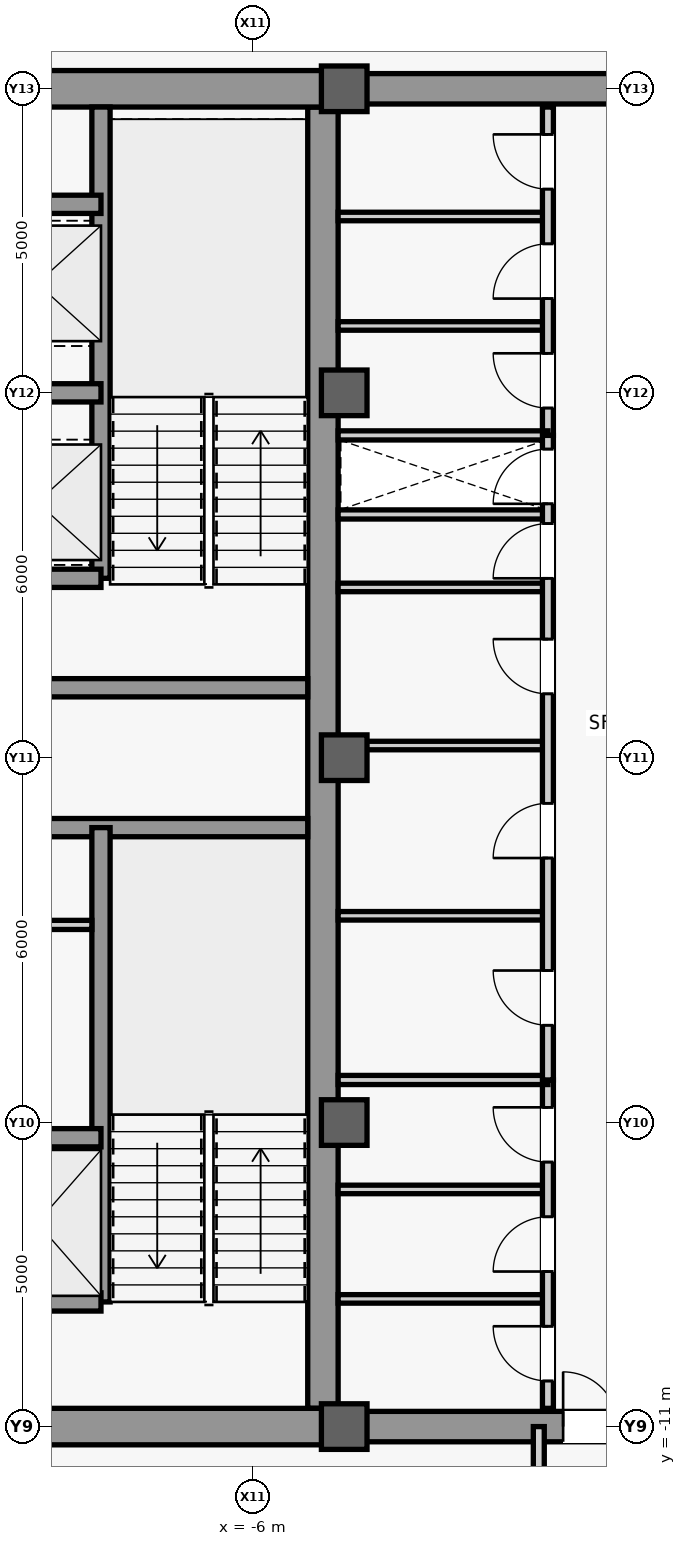
"""IFC4 building model, lengths in metres.
Left out: names, types, materials, properties, quantities, classifications, styles, units other than length and angle.
Written with IfcOpenShell. Run it as: python <this file> out.ifc"""

import sys

from ifc_helpers import new_model, si_unit, direction, frame, frame_2d, origin, origin_2d, place, context, subcontext, project, spatial, rectangle, extrude, source, transform, mapped, element, fill, save


model = new_model("IFC4")
c1 = context("Model", 3, precision=1e-05, world=origin(), true_north=direction((0.0, 1.0)))
c2 = subcontext(c1, "Body", "Model", "MODEL_VIEW")
j1 = project(units=[si_unit("LENGTHUNIT", "METRE"), si_unit("PLANEANGLEUNIT", "RADIAN")], contexts=[c1])
p1 = place(None, origin())
s1 = spatial("IfcSite", under=j1, at=p1, CompositionType="ELEMENT")
p2 = place(p1, origin())
s2 = spatial("IfcBuilding", under=s1, at=p2, CompositionType="ELEMENT")
p3 = place(p2, frame((0.0, 0.0, 277.5)))
s3 = spatial("IfcBuildingStorey", under=s2, at=p3, CompositionType="ELEMENT", Elevation=277.5)
m1 = source(origin(), c2, "Body", "SweptSolid", [
    extrude(rectangle(XDim=21.4, YDim=0.5, at=frame_2d((10.7, 0.0))), origin(), (0.0, 0.0, 1.0), 3.78),
])
p4 = place(p3, frame((-4.85, -10.7, 0.0), z_axis=(0.0, 0.0, 1.0), x_axis=(0.0, 1.0, 0.0)))
e1 = element("IfcWall", 1, at=p4, inside=s3, PredefinedType="SHEAR", context=c2, shape_type="MappedRepresentation", body=[
    mapped(m1, transform((0.0, 0.0, 0.0), scale=1.0)),
])
m2 = source(origin(), c2, "Body", "SweptSolid", [
    extrude(rectangle(XDim=5.9, YDim=0.6, at=frame_2d((2.95, 0.0))), origin(), (0.0, 0.0, 1.0), 3.78),
])
for number, where, z_axis, x_axis in (
    (2, (-10.75, -11.0, 0.0), (0.0, 0.0, 1.0), (1.0, 0.0, 0.0)),
    (3, (-10.75, 11.0, 0.0), (0.0, 0.0, 1.0), (1.0, 0.0, 0.0)),
):
    element("IfcWall", number, at=place(p3, frame(where, z_axis=z_axis, x_axis=x_axis)), inside=s3, PredefinedType="SHEAR", context=c2, shape_type="MappedRepresentation", body=[
        mapped(m2, transform((0.0, 0.0, 0.0), scale=1.0)),
    ])
m3 = source(origin(), c2, "Body", "SweptSolid", [
    extrude(rectangle(XDim=5.65, YDim=0.3, at=frame_2d((2.825, 0.0))), origin(), (0.0, 0.0, 1.0), 3.78),
])
for number, where, z_axis, x_axis in (
    (4, (-10.75, -1.15, 0.0), (0.0, 0.0, 1.0), (1.0, 0.0, 0.0)),
    (5, (-10.75, 1.15, 0.0), (0.0, 0.0, 1.0), (1.0, 0.0, 0.0)),
):
    element("IfcWall", number, at=place(p3, frame(where, z_axis=z_axis, x_axis=x_axis)), inside=s3, PredefinedType="SHEAR", context=c2, shape_type="MappedRepresentation", body=[
        mapped(m3, transform((0.0, 0.0, 0.0), scale=1.0)),
    ])
m4 = source(origin(), c2, "Body", "SweptSolid", [
    extrude(rectangle(XDim=9.2, YDim=0.5, at=frame_2d((4.6, 0.0))), origin(), (0.0, 0.0, 1.0), 3.78),
])
p5 = place(p3, frame((-4.6, -11.0, 0.0), z_axis=(0.0, 0.0, 1.0), x_axis=(1.0, 0.0, 0.0)))
e6 = element("IfcWall", 6, at=p5, inside=s3, PredefinedType="SHEAR", context=c2, shape_type="MappedRepresentation", body=[
    mapped(m4, transform((0.0, 0.0, 0.0), scale=1.0)),
])
m5 = source(origin(), c2, "Body", "SweptSolid", [
    extrude(rectangle(XDim=1.8, YDim=2.25, at=frame_2d((0.9, 1.125))), frame((0.0, 0.26, 0.0), z_axis=(0.0, -1.0, 0.0), x_axis=(1.0, 0.0, 0.0)), (0.0, 0.0, 1.0), 0.52),
])
p6 = place(p5, frame((3.7, 0.0, 0.0)))
e7 = element("IfcOpeningElement", 7, at=p6, cuts=e6, PredefinedType="OPENING", context=c2, shape_type="MappedRepresentation", body=[
    mapped(m5, transform((0.0, 0.0, 0.0), scale=1.0)),
])
p7 = place(p3, frame((-4.6, 11.0, 0.0), z_axis=(0.0, 0.0, 1.0), x_axis=(1.0, 0.0, 0.0)))
e8 = element("IfcWall", 8, at=p7, inside=s3, PredefinedType="SHEAR", context=c2, shape_type="MappedRepresentation", body=[
    mapped(m4, transform((0.0, 0.0, 0.0), scale=1.0)),
])
m6 = source(origin(), c2, "Body", "SweptSolid", [
    extrude(rectangle(XDim=0.75, YDim=0.75, at=origin_2d()), origin(), (0.0, 0.0, 1.0), 4.0),
])
for number, where, z_axis, x_axis in (
    (9, (-4.5, -11.0, 0.0), (0.0, 0.0, 1.0), (1.0, 0.0, 0.0)),
    (10, (-4.5, -6.0, 0.0), (0.0, 0.0, 1.0), (1.0, 0.0, 0.0)),
    (11, (-4.5, 0.0, 0.0), (0.0, 0.0, 1.0), (1.0, 0.0, 0.0)),
    (12, (-4.5, 6.0, 0.0), (0.0, 0.0, 1.0), (1.0, 0.0, 0.0)),
    (13, (-4.5, 11.0, 0.0), (0.0, 0.0, 1.0), (1.0, 0.0, 0.0)),
):
    element("IfcColumn", number, at=place(p3, frame(where, z_axis=z_axis, x_axis=x_axis)), inside=s3, PredefinedType="COLUMN", context=c2, shape_type="MappedRepresentation", body=[
        mapped(m6, transform((0.0, 0.0, 0.0), scale=1.0)),
    ])
m7 = source(origin(), c2, "Body", "SweptSolid", [
    extrude(rectangle(XDim=7.8, YDim=0.3, at=frame_2d((3.9, 0.0))), origin(), (0.0, 0.0, 1.0), 3.78),
])
p8 = place(p3, frame((-8.5, -8.95, 0.0), z_axis=(0.0, 0.0, 1.0), x_axis=(0.0, 1.0, 0.0)))
e14 = element("IfcWall", 14, at=p8, inside=s3, PredefinedType="SHEAR", context=c2, shape_type="MappedRepresentation", body=[
    mapped(m7, transform((0.0, 0.0, 0.0), scale=1.0)),
])
m8 = source(origin(), c2, "Body", "SweptSolid", [
    extrude(rectangle(XDim=2.2, YDim=0.3, at=frame_2d((1.1, 0.0))), origin(), (0.0, 0.0, 1.0), 3.78),
])
for number, where, z_axis, x_axis in (
    (15, (-10.7, -8.95, 0.0), (0.0, 0.0, 1.0), (1.0, 0.0, 0.0)),
    (16, (-10.7, -6.25, 0.0), (0.0, 0.0, 1.0), (1.0, 0.0, 0.0)),
):
    element("IfcWall", number, at=place(p3, frame(where, z_axis=z_axis, x_axis=x_axis)), inside=s3, PredefinedType="SHEAR", context=c2, shape_type="MappedRepresentation", body=[
        mapped(m8, transform((0.0, 0.0, 0.0), scale=1.0)),
    ])
m9 = source(origin(), c2, "Body", "SweptSolid", [
    extrude(rectangle(XDim=7.75, YDim=0.3, at=frame_2d((3.875, 0.0))), origin(), (0.0, 0.0, 1.0), 3.78),
])
p9 = place(p3, frame((-8.5, 2.95, 0.0), z_axis=(0.0, 0.0, 1.0), x_axis=(0.0, 1.0, 0.0)))
e17 = element("IfcWall", 17, at=p9, inside=s3, PredefinedType="SHEAR", context=c2, shape_type="MappedRepresentation", body=[
    mapped(m9, transform((0.0, 0.0, 0.0), scale=1.0)),
])
for number, where, z_axis, x_axis in (
    (18, (-10.7, 2.95, 0.0), (0.0, 0.0, 1.0), (1.0, 0.0, 0.0)),
    (19, (-10.7, 6.0, 0.0), (0.0, 0.0, 1.0), (1.0, 0.0, 0.0)),
    (20, (-10.7, 9.1, 0.0), (0.0, 0.0, 1.0), (1.0, 0.0, 0.0)),
):
    element("IfcWall", number, at=place(p3, frame(where, z_axis=z_axis, x_axis=x_axis)), inside=s3, PredefinedType="SHEAR", context=c2, shape_type="MappedRepresentation", body=[
        mapped(m8, transform((0.0, 0.0, 0.0), scale=1.0)),
    ])
m10 = source(origin(), c2, "Body", "SweptSolid", [
    extrude(rectangle(XDim=2.05, YDim=0.15, at=frame_2d((1.025, 0.0))), origin(), (0.0, 0.0, 1.0), 3.78),
])
p10 = place(p3, frame((-10.7, -2.75, 0.0), z_axis=(0.0, 0.0, 1.0), x_axis=(1.0, 0.0, 0.0)))
e21 = element("IfcWall", 21, at=p10, inside=s3, PredefinedType="PARTITIONING", context=c2, shape_type="MappedRepresentation", body=[
    mapped(m10, transform((0.0, 0.0, 0.0), scale=1.0)),
])
m11 = source(origin(), c2, "Body", "SweptSolid", [
    extrude(rectangle(XDim=3.45, YDim=0.15, at=frame_2d((1.725, 0.0))), origin(), (0.0, 0.0, 1.0), 3.78),
])
p11 = place(p3, frame((-4.6, 4.0, 0.0), z_axis=(0.0, 0.0, 1.0), x_axis=(1.0, 0.0, 0.0)))
e22 = element("IfcWall", 22, at=p11, inside=s3, PredefinedType="PARTITIONING", context=c2, shape_type="MappedRepresentation", body=[
    mapped(m11, transform((0.0, 0.0, 0.0), scale=1.0)),
])
m12 = source(origin(), c2, "Body", "SweptSolid", [
    extrude(rectangle(XDim=3.45, YDim=0.14, at=frame_2d((1.725, 0.0))), origin(), (0.0, 0.0, 1.0), 3.78),
])
for number, where, z_axis, x_axis in (
    (23, (-4.6, -8.9, 0.0), (0.0, 0.0, 1.0), (1.0, 0.0, 0.0)),
    (24, (-4.6, -7.1, 0.0), (0.0, 0.0, 1.0), (1.0, 0.0, 0.0)),
):
    element("IfcWall", number, at=place(p3, frame(where, z_axis=z_axis, x_axis=x_axis)), inside=s3, PredefinedType="PARTITIONING", context=c2, shape_type="MappedRepresentation", body=[
        mapped(m12, transform((0.0, 0.0, 0.0), scale=1.0)),
    ])
m13 = source(origin(), c2, "Body", "SweptSolid", [
    extrude(rectangle(XDim=5.4, YDim=0.18, at=frame_2d((2.7, 0.0))), origin(), (0.0, 0.0, 1.0), 3.78),
])
p12 = place(p3, frame((-1.15, -10.7, 0.0), z_axis=(0.0, 0.0, 1.0), x_axis=(0.0, 1.0, 0.0)))
e25 = element("IfcWall", 25, at=p12, inside=s3, PredefinedType="PARTITIONING", context=c2, shape_type="MappedRepresentation", body=[
    mapped(m13, transform((0.0, 0.0, 0.0), scale=1.0)),
])
m14 = source(origin(), c2, "Body", "SweptSolid", [
    extrude(rectangle(XDim=0.9, YDim=2.15, at=frame_2d((0.45, 1.075))), frame((0.0, 0.1, 0.0), z_axis=(0.0, -1.0, 0.0), x_axis=(1.0, 0.0, 0.0)), (0.0, 0.0, 1.0), 0.2),
])
p13 = place(p12, frame((0.45, 0.0, 0.0)))
e26 = element("IfcOpeningElement", 26, at=p13, cuts=e25, PredefinedType="OPENING", context=c2, shape_type="MappedRepresentation", body=[
    mapped(m14, transform((0.0, 0.0, 0.0), scale=1.0)),
])
p14 = place(p12, frame((2.25, 0.0, 0.0)))
e27 = element("IfcOpeningElement", 27, at=p14, cuts=e25, PredefinedType="OPENING", context=c2, shape_type="MappedRepresentation", body=[
    mapped(m14, transform((0.0, 0.0, 0.0), scale=1.0)),
])
p15 = place(p12, frame((4.05, 0.0, 0.0)))
e28 = element("IfcOpeningElement", 28, at=p15, cuts=e25, PredefinedType="OPENING", context=c2, shape_type="MappedRepresentation", body=[
    mapped(m14, transform((0.0, 0.0, 0.0), scale=1.0)),
])
p16 = place(p3, frame((-4.6, -5.3, 0.0), z_axis=(0.0, 0.0, 1.0), x_axis=(1.0, 0.0, 0.0)))
e29 = element("IfcWall", 29, at=p16, inside=s3, PredefinedType="PARTITIONING", context=c2, shape_type="MappedRepresentation", body=[
    mapped(m11, transform((0.0, 0.0, 0.0), scale=1.0)),
])
for number, where, z_axis, x_axis in (
    (30, (-4.6, 7.1, 0.0), (0.0, 0.0, 1.0), (1.0, 0.0, 0.0)),
    (31, (-4.6, 8.9, 0.0), (0.0, 0.0, 1.0), (1.0, 0.0, 0.0)),
):
    element("IfcWall", number, at=place(p3, frame(where, z_axis=z_axis, x_axis=x_axis)), inside=s3, PredefinedType="PARTITIONING", context=c2, shape_type="MappedRepresentation", body=[
        mapped(m12, transform((0.0, 0.0, 0.0), scale=1.0)),
    ])
p17 = place(p3, frame((-1.15, 5.3, 0.0), z_axis=(0.0, 0.0, 1.0), x_axis=(0.0, 1.0, 0.0)))
e32 = element("IfcWall", 32, at=p17, inside=s3, PredefinedType="PARTITIONING", context=c2, shape_type="MappedRepresentation", body=[
    mapped(m13, transform((0.0, 0.0, 0.0), scale=1.0)),
])
p18 = place(p17, frame((0.45, 0.0, 0.0)))
e33 = element("IfcOpeningElement", 33, at=p18, cuts=e32, PredefinedType="OPENING", context=c2, shape_type="MappedRepresentation", body=[
    mapped(m14, transform((0.0, 0.0, 0.0), scale=1.0)),
])
p19 = place(p17, frame((2.25, 0.0, 0.0)))
e34 = element("IfcOpeningElement", 34, at=p19, cuts=e32, PredefinedType="OPENING", context=c2, shape_type="MappedRepresentation", body=[
    mapped(m14, transform((0.0, 0.0, 0.0), scale=1.0)),
])
p20 = place(p17, frame((4.05, 0.0, 0.0)))
e35 = element("IfcOpeningElement", 35, at=p20, cuts=e32, PredefinedType="OPENING", context=c2, shape_type="MappedRepresentation", body=[
    mapped(m14, transform((0.0, 0.0, 0.0), scale=1.0)),
])
p21 = place(p3, frame((-4.6, 5.3, 0.0), z_axis=(0.0, 0.0, 1.0), x_axis=(1.0, 0.0, 0.0)))
e36 = element("IfcWall", 36, at=p21, inside=s3, PredefinedType="PARTITIONING", context=c2, shape_type="MappedRepresentation", body=[
    mapped(m11, transform((0.0, 0.0, 0.0), scale=1.0)),
])
p22 = place(p3, frame((-4.6, -2.6, 0.0), z_axis=(0.0, 0.0, 1.0), x_axis=(1.0, 0.0, 0.0)))
e37 = element("IfcWall", 37, at=p22, inside=s3, PredefinedType="PARTITIONING", context=c2, shape_type="MappedRepresentation", body=[
    mapped(m12, transform((0.0, 0.0, 0.0), scale=1.0)),
])
m15 = source(origin(), c2, "Body", "SweptSolid", [
    extrude(rectangle(XDim=3.45, YDim=0.14, at=frame_2d((1.725, 0.0))), origin(), (0.0, 0.0, 1.0), 3.085),
])
p23 = place(p3, frame((-4.6, 0.2, 0.0), z_axis=(0.0, 0.0, 1.0), x_axis=(1.0, 0.0, 0.0)))
e38 = element("IfcWall", 38, at=p23, inside=s3, PredefinedType="PARTITIONING", context=c2, shape_type="MappedRepresentation", body=[
    mapped(m15, transform((0.0, 0.0, 0.0), scale=1.0)),
])
p24 = place(p3, frame((-4.6, 2.8, 0.0), z_axis=(0.0, 0.0, 1.0), x_axis=(1.0, 0.0, 0.0)))
e39 = element("IfcWall", 39, at=p24, inside=s3, PredefinedType="PARTITIONING", context=c2, shape_type="MappedRepresentation", body=[
    mapped(m12, transform((0.0, 0.0, 0.0), scale=1.0)),
])
m16 = source(origin(), c2, "Body", "SweptSolid", [
    extrude(rectangle(XDim=10.6, YDim=0.18, at=frame_2d((5.3, 0.0))), origin(), (0.0, 0.0, 1.0), 3.78),
])
p25 = place(p3, frame((-1.15, -5.3, 0.0), z_axis=(0.0, 0.0, 1.0), x_axis=(0.0, 1.0, 0.0)))
e40 = element("IfcWall", 40, at=p25, inside=s3, PredefinedType="PARTITIONING", context=c2, shape_type="MappedRepresentation", body=[
    mapped(m16, transform((0.0, 0.0, 0.0), scale=1.0)),
])
p26 = place(p25, frame((0.9, 0.0, 0.0)))
e41 = element("IfcOpeningElement", 41, at=p26, cuts=e40, PredefinedType="OPENING", context=c2, shape_type="MappedRepresentation", body=[
    mapped(m14, transform((0.0, 0.0, 0.0), scale=1.0)),
])
p27 = place(p25, frame((3.65, 0.0, 0.0)))
e42 = element("IfcOpeningElement", 42, at=p27, cuts=e40, PredefinedType="OPENING", context=c2, shape_type="MappedRepresentation", body=[
    mapped(m14, transform((0.0, 0.0, 0.0), scale=1.0)),
])
p28 = place(p25, frame((6.35, 0.0, 0.0)))
e43 = element("IfcOpeningElement", 43, at=p28, cuts=e40, PredefinedType="OPENING", context=c2, shape_type="MappedRepresentation", body=[
    mapped(m14, transform((0.0, 0.0, 0.0), scale=1.0)),
])
p29 = place(p25, frame((8.25, 0.0, 0.0)))
e44 = element("IfcOpeningElement", 44, at=p29, cuts=e40, PredefinedType="OPENING", context=c2, shape_type="MappedRepresentation", body=[
    mapped(m14, transform((0.0, 0.0, 0.0), scale=1.0)),
])
p30 = place(p25, frame((9.475, 0.0, 0.0)))
e45 = element("IfcOpeningElement", 45, at=p30, cuts=e40, PredefinedType="OPENING", context=c2, shape_type="MappedRepresentation", body=[
    mapped(m14, transform((0.0, 0.0, 0.0), scale=1.0)),
])
m17 = source(origin(), c2, "Body", "SweptSolid", [
    extrude(rectangle(XDim=6.0, YDim=0.18, at=frame_2d((3.0, 0.0))), origin(), (0.0, 0.0, 1.0), 3.78),
])
p31 = place(p3, frame((-1.3, -17.0, 0.0), z_axis=(0.0, 0.0, 1.0), x_axis=(0.0, 1.0, 0.0)))
e46 = element("IfcWall", 46, at=p31, inside=s3, PredefinedType="PARTITIONING", context=c2, shape_type="MappedRepresentation", body=[
    mapped(m17, transform((0.0, 0.0, 0.0), scale=1.0)),
])
m18 = source(origin(), c2, "Body", "SweptSolid", [
    extrude(rectangle(XDim=0.9, YDim=2.15, at=frame_2d((0.45, 1.075))), frame((0.0, 0.025, 0.0), z_axis=(0.0, -1.0, 0.0), x_axis=(1.0, 0.0, 0.0)), (0.0, 0.0, 1.0), 0.05),
])
p32 = place(p13, origin())
e47 = element("IfcDoor", 47, at=p32, inside=s3, OperationType="SINGLE_SWING_RIGHT", PredefinedType="DOOR", context=c2, shape_type="MappedRepresentation", body=[
    mapped(m18, transform((0.0, 0.0, 0.0), scale=1.0)),
])
fill(e26, e47)
p33 = place(p14, origin())
e48 = element("IfcDoor", 48, at=p33, inside=s3, OperationType="SINGLE_SWING_LEFT", PredefinedType="DOOR", context=c2, shape_type="MappedRepresentation", body=[
    mapped(m18, transform((0.0, 0.0, 0.0), scale=1.0)),
])
fill(e27, e48)
p34 = place(p15, origin())
e49 = element("IfcDoor", 49, at=p34, inside=s3, OperationType="SINGLE_SWING_RIGHT", PredefinedType="DOOR", context=c2, shape_type="MappedRepresentation", body=[
    mapped(m18, transform((0.0, 0.0, 0.0), scale=1.0)),
])
fill(e28, e49)
m19 = source(origin(), c2, "Body", "SweptSolid", [
    extrude(rectangle(XDim=1.8, YDim=2.25, at=frame_2d((0.9, 1.125))), frame((0.0, 0.025, 0.0), z_axis=(0.0, -1.0, 0.0), x_axis=(1.0, 0.0, 0.0)), (0.0, 0.0, 1.0), 0.05),
])
p35 = place(p6, origin())
e50 = element("IfcDoor", 50, at=p35, inside=s3, OperationType="SINGLE_SWING_LEFT", PredefinedType="DOOR", context=c2, shape_type="MappedRepresentation", body=[
    mapped(m19, transform((0.0, 0.0, 0.0), scale=1.0)),
])
fill(e7, e50)
p36 = place(p18, origin())
e51 = element("IfcDoor", 51, at=p36, inside=s3, OperationType="SINGLE_SWING_RIGHT", PredefinedType="DOOR", context=c2, shape_type="MappedRepresentation", body=[
    mapped(m18, transform((0.0, 0.0, 0.0), scale=1.0)),
])
fill(e33, e51)
p37 = place(p19, origin())
e52 = element("IfcDoor", 52, at=p37, inside=s3, OperationType="SINGLE_SWING_LEFT", PredefinedType="DOOR", context=c2, shape_type="MappedRepresentation", body=[
    mapped(m18, transform((0.0, 0.0, 0.0), scale=1.0)),
])
fill(e34, e52)
p38 = place(p20, origin())
e53 = element("IfcDoor", 53, at=p38, inside=s3, OperationType="SINGLE_SWING_RIGHT", PredefinedType="DOOR", context=c2, shape_type="MappedRepresentation", body=[
    mapped(m18, transform((0.0, 0.0, 0.0), scale=1.0)),
])
fill(e35, e53)
p39 = place(p26, origin())
e54 = element("IfcDoor", 54, at=p39, inside=s3, OperationType="SINGLE_SWING_RIGHT", PredefinedType="DOOR", context=c2, shape_type="MappedRepresentation", body=[
    mapped(m18, transform((0.0, 0.0, 0.0), scale=1.0)),
])
fill(e41, e54)
p40 = place(p27, origin())
e55 = element("IfcDoor", 55, at=p40, inside=s3, OperationType="SINGLE_SWING_LEFT", PredefinedType="DOOR", context=c2, shape_type="MappedRepresentation", body=[
    mapped(m18, transform((0.0, 0.0, 0.0), scale=1.0)),
])
fill(e42, e55)
p41 = place(p28, origin())
e56 = element("IfcDoor", 56, at=p41, inside=s3, OperationType="SINGLE_SWING_RIGHT", PredefinedType="DOOR", context=c2, shape_type="MappedRepresentation", body=[
    mapped(m18, transform((0.0, 0.0, 0.0), scale=1.0)),
])
fill(e43, e56)
p42 = place(p29, origin())
e57 = element("IfcDoor", 57, at=p42, inside=s3, OperationType="SINGLE_SWING_LEFT", PredefinedType="DOOR", context=c2, shape_type="MappedRepresentation", body=[
    mapped(m18, transform((0.0, 0.0, 0.0), scale=1.0)),
])
fill(e44, e57)
p43 = place(p30, origin())
e58 = element("IfcDoor", 58, at=p43, inside=s3, OperationType="SINGLE_SWING_LEFT", PredefinedType="DOOR", context=c2, shape_type="MappedRepresentation", body=[
    mapped(m18, transform((0.0, 0.0, 0.0), scale=1.0)),
])
fill(e45, e58)
save(model, sys.argv[1])
